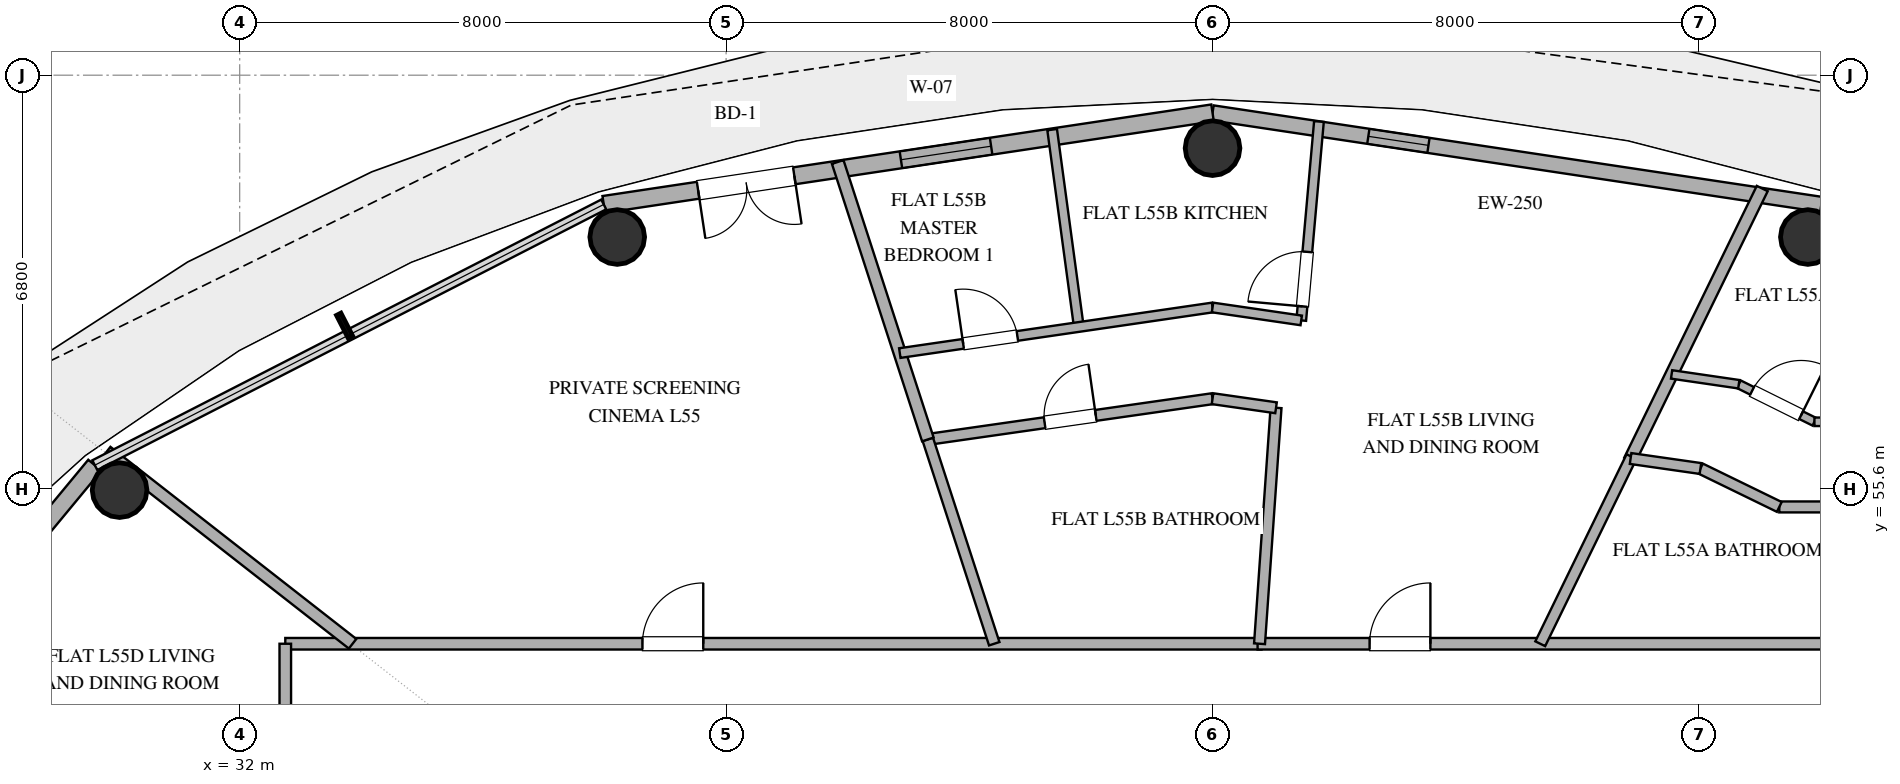
"""IFC4 building model, lengths in metres.
Left out: names, types, materials, properties, quantities, classifications, styles, units other than length and angle.
Written with IfcOpenShell. Run it as: python <this file> out.ifc"""

import sys

from ifc_helpers import new_model, si_unit, direction, frame, frame_2d, origin, origin_2d, place, context, subcontext, project, spatial, rectangle, hollow_circle, extrude, element, fill, save


model = new_model("IFC4")
c1 = context("Model", 3, precision=1e-05, world=origin(), true_north=direction((0.0, 1.0)))
c2 = subcontext(c1, "Body", "Model", "MODEL_VIEW")
j1 = project(units=[si_unit("LENGTHUNIT", "METRE"), si_unit("PLANEANGLEUNIT", "RADIAN")], contexts=[c1])
p1 = place(None, origin())
s1 = spatial("IfcSite", under=j1, at=p1, CompositionType="ELEMENT")
p2 = place(p1, origin())
s2 = spatial("IfcBuilding", under=s1, at=p2, CompositionType="ELEMENT")
p3 = place(p2, frame((0.0, 0.0, 217.2)))
s3 = spatial("IfcBuildingStorey", under=s2, at=p3, CompositionType="ELEMENT", Elevation=217.2)
for number, where, z_axis, x_axis in (
    (1, (57.791, 59.739, 0.0), (0.0, 0.0, 1.0), (1.0, 0.0, 0.0)),
    (2, (48.0, 61.2, 0.0), (0.0, 0.0, 1.0), (1.0, 0.0, 0.0)),
    (3, (38.209, 59.739, 0.0), (0.0, 0.0, 1.0), (1.0, 0.0, 0.0)),
    (4, (30.025, 55.576, 0.0), (0.0, 0.0, 1.0), (1.0, 0.0, 0.0)),
):
    element("IfcColumn", number, at=place(p3, frame(where, z_axis=z_axis, x_axis=x_axis)), inside=s3, PredefinedType="COLUMN", context=c2, shape_type="SweptSolid", body=[
        extrude(hollow_circle(Radius=0.45, WallThickness=0.025, at=origin_2d()), origin(), (0.0, 0.0, 1.0), 3.36),
    ])
p4 = place(p3, frame((66.383, 55.987, 0.0), z_axis=(0.0, 0.0, 1.0), x_axis=(-0.890007394051, 0.455946091699, 0.0)))
e5 = element("IfcWall", 5, at=p4, inside=s3, PredefinedType="SOLIDWALL", context=c2, shape_type="SweptSolid", body=[
    extrude(rectangle(XDim=9.404, YDim=0.28, at=frame_2d((4.702, 0.0))), origin(), (0.0, 0.0, 1.0), 3.36),
])
p5 = place(p4, frame((1.661, 0.0, 0.85)))
e6 = element("IfcOpeningElement", 6, at=p5, cuts=e5, PredefinedType="OPENING", context=c2, shape_type="SweptSolid", body=[
    extrude(rectangle(XDim=1.0, YDim=1.8, at=frame_2d((0.5, 0.9))), frame((0.0, 0.15, 0.0), z_axis=(0.0, -1.0, 0.0), x_axis=(1.0, 0.0, 0.0)), (0.0, 0.0, 1.0), 0.3),
])
p6 = place(p4, frame((3.823, 0.0, 0.85)))
e7 = element("IfcOpeningElement", 7, at=p6, cuts=e5, PredefinedType="OPENING", context=c2, shape_type="SweptSolid", body=[
    extrude(rectangle(XDim=1.5, YDim=2.0, at=frame_2d((0.75, 1.0))), frame((0.0, 0.15, 0.0), z_axis=(0.0, -1.0, 0.0), x_axis=(1.0, 0.0, 0.0)), (0.0, 0.0, 1.0), 0.3),
])
p7 = place(p4, frame((6.503, 0.0, 0.85)))
e8 = element("IfcOpeningElement", 8, at=p7, cuts=e5, PredefinedType="OPENING", context=c2, shape_type="SweptSolid", body=[
    extrude(rectangle(XDim=1.35, YDim=1.8, at=frame_2d((0.675, 0.9))), frame((0.0, 0.15, 0.0), z_axis=(0.0, -1.0, 0.0), x_axis=(1.0, 0.0, 0.0)), (0.0, 0.0, 1.0), 0.3),
])
p8 = place(p3, frame((58.013, 60.274, 0.0), z_axis=(0.0, 0.0, 1.0), x_axis=(-0.988882522213, 0.148698881169, 0.0)))
e9 = element("IfcWall", 9, at=p8, inside=s3, PredefinedType="SOLIDWALL", context=c2, shape_type="SweptSolid", body=[
    extrude(rectangle(XDim=10.125, YDim=0.25, at=frame_2d((5.062, 0.0))), origin(), (0.0, 0.0, 1.0), 3.36),
])
p9 = place(p8, frame((6.534, 0.0, 1.42)))
e10 = element("IfcOpeningElement", 10, at=p9, cuts=e9, PredefinedType="OPENING", context=c2, shape_type="SweptSolid", body=[
    extrude(rectangle(XDim=1.0, YDim=1.05, at=frame_2d((0.5, 0.525))), frame((0.0, 0.135, 0.0), z_axis=(0.0, -1.0, 0.0), x_axis=(1.0, 0.0, 0.0)), (0.0, 0.0, 1.0), 0.27),
])
p10 = place(p3, frame((48.0, 61.78, 0.0), z_axis=(0.0, 0.0, 1.0), x_axis=(-0.988882522213, -0.148698881169, 0.0)))
e11 = element("IfcWall", 11, at=p10, inside=s3, PredefinedType="SOLIDWALL", context=c2, shape_type="SweptSolid", body=[
    extrude(rectangle(XDim=10.125, YDim=0.28, at=frame_2d((5.062, 0.0))), origin(), (0.0, 0.0, 1.0), 3.36),
])
p11 = place(p10, frame((3.683, 0.0, 0.85)))
e12 = element("IfcOpeningElement", 12, at=p11, cuts=e11, PredefinedType="OPENING", context=c2, shape_type="SweptSolid", body=[
    extrude(rectangle(XDim=1.5, YDim=1.8, at=frame_2d((0.75, 0.9))), frame((0.0, 0.15, 0.0), z_axis=(0.0, -1.0, 0.0), x_axis=(1.0, 0.0, 0.0)), (0.0, 0.0, 1.0), 0.3),
])
p12 = place(p10, frame((6.956, 0.0, 0.0)))
e13 = element("IfcOpeningElement", 13, at=p12, cuts=e11, PredefinedType="OPENING", context=c2, shape_type="SweptSolid", body=[
    extrude(rectangle(XDim=1.6, YDim=2.25, at=frame_2d((0.8, 1.125))), frame((0.0, 0.15, 0.0), z_axis=(0.0, -1.0, 0.0), x_axis=(1.0, 0.0, 0.0)), (0.0, 0.0, 1.0), 0.3),
])
p13 = place(p3, frame((29.617, 55.987, 0.0), z_axis=(0.0, 0.0, 1.0), x_axis=(-0.63761509934, -0.770355103243, 0.0)))
e14 = element("IfcWall", 14, at=p13, inside=s3, PredefinedType="SOLIDWALL", context=c2, shape_type="SweptSolid", body=[
    extrude(rectangle(XDim=8.33, YDim=0.28, at=frame_2d((4.165, 0.0))), origin(), (0.0, 0.0, 1.0), 3.36),
])
p14 = place(p13, frame((2.074, 0.0, 0.85)))
e15 = element("IfcOpeningElement", 15, at=p14, cuts=e14, PredefinedType="OPENING", context=c2, shape_type="SweptSolid", body=[
    extrude(rectangle(XDim=1.2, YDim=1.8, at=frame_2d((0.6, 0.9))), frame((0.0, 0.15, 0.0), z_axis=(0.0, -1.0, 0.0), x_axis=(1.0, 0.0, 0.0)), (0.0, 0.0, 1.0), 0.3),
])
p15 = place(p13, frame((3.892, 0.0, 0.85)))
e16 = element("IfcOpeningElement", 16, at=p15, cuts=e14, PredefinedType="OPENING", context=c2, shape_type="SweptSolid", body=[
    extrude(rectangle(XDim=1.2, YDim=1.8, at=frame_2d((0.6, 0.9))), frame((0.0, 0.15, 0.0), z_axis=(0.0, -1.0, 0.0), x_axis=(1.0, 0.0, 0.0)), (0.0, 0.0, 1.0), 0.3),
])
p16 = place(p3, frame((32.75, 53.05, 0.0), z_axis=(0.0, 0.0, 1.0), x_axis=(1.0, 0.0, 0.0)))
e17 = element("IfcWall", 17, at=p16, inside=s3, PredefinedType="PARTITIONING", context=c2, shape_type="SweptSolid", body=[
    extrude(rectangle(XDim=16.055, YDim=0.19, at=frame_2d((8.027, 0.0))), origin(), (0.0, 0.0, 1.0), 2.72),
])
p17 = place(p16, frame((5.874, 0.0, 0.0)))
e18 = element("IfcOpeningElement", 18, at=p17, cuts=e17, PredefinedType="OPENING", context=c2, shape_type="SweptSolid", body=[
    extrude(rectangle(XDim=1.0, YDim=2.2, at=frame_2d((0.5, 1.1))), frame((0.0, 0.105, 0.0), z_axis=(0.0, -1.0, 0.0), x_axis=(1.0, 0.0, 0.0)), (0.0, 0.0, 1.0), 0.21),
])
p18 = place(p3, frame((48.74, 53.05, 0.0), z_axis=(0.0, 0.0, 1.0), x_axis=(1.0, 0.0, 0.0)))
e19 = element("IfcWall", 19, at=p18, inside=s3, PredefinedType="PARTITIONING", context=c2, shape_type="SweptSolid", body=[
    extrude(rectangle(XDim=14.51, YDim=0.19, at=frame_2d((7.255, 0.0))), origin(), (0.0, 0.0, 1.0), 2.72),
])
p19 = place(p18, frame((1.842, 0.0, 0.0)))
e20 = element("IfcOpeningElement", 20, at=p19, cuts=e19, PredefinedType="OPENING", context=c2, shape_type="SweptSolid", body=[
    extrude(rectangle(XDim=1.0, YDim=2.2, at=frame_2d((0.5, 1.1))), frame((0.0, 0.105, 0.0), z_axis=(0.0, -1.0, 0.0), x_axis=(1.0, 0.0, 0.0)), (0.0, 0.0, 1.0), 0.21),
])
p20 = place(p3, frame((32.75, 43.356, 0.0), z_axis=(0.0, 0.0, 1.0), x_axis=(0.0, 1.0, 0.0)))
e21 = element("IfcWall", 21, at=p20, inside=s3, PredefinedType="PARTITIONING", context=c2, shape_type="SweptSolid", body=[
    extrude(rectangle(XDim=9.694, YDim=0.19, at=frame_2d((4.847, 0.0))), origin(), (0.0, 0.0, 1.0), 2.72),
])
p21 = place(p20, frame((5.983, 0.0, 0.0)))
e22 = element("IfcOpeningElement", 22, at=p21, cuts=e21, PredefinedType="OPENING", context=c2, shape_type="SweptSolid", body=[
    extrude(rectangle(XDim=1.0, YDim=2.2, at=frame_2d((0.5, 1.1))), frame((0.0, 0.105, 0.0), z_axis=(0.0, -1.0, 0.0), x_axis=(1.0, 0.0, 0.0)), (0.0, 0.0, 1.0), 0.21),
])
p22 = place(p3, frame((29.813, 56.209, 0.0), z_axis=(0.0, 0.0, 1.0), x_axis=(0.788043849094, -0.615619112687, 0.0)))
e23 = element("IfcWall", 23, at=p22, inside=s3, PredefinedType="PARTITIONING", context=c2, shape_type="SweptSolid", body=[
    extrude(rectangle(XDim=5.131, YDim=0.2, at=frame_2d((2.566, 0.0))), origin(), (0.0, 0.0, 1.0), 2.72),
])
p23 = place(p3, frame((43.318, 56.41, 0.0), z_axis=(0.0, 0.0, 1.0), x_axis=(0.989918499483, 0.141638145927, 0.0)))
e24 = element("IfcWall", 24, at=p23, inside=s3, PredefinedType="PLUMBINGWALL", context=c2, shape_type="SweptSolid", body=[
    extrude(rectangle(XDim=4.73, YDim=0.18, at=frame_2d((2.365, 0.0))), origin(), (0.0, 0.0, 1.0), 2.72),
])
p24 = place(p23, frame((1.94, 0.0, 0.0)))
e25 = element("IfcOpeningElement", 25, at=p24, cuts=e24, PredefinedType="OPENING", context=c2, shape_type="SweptSolid", body=[
    extrude(rectangle(XDim=0.85, YDim=2.1, at=frame_2d((0.425, 1.05))), frame((0.0, 0.1, 0.0), z_axis=(0.0, -1.0, 0.0), x_axis=(1.0, 0.0, 0.0)), (0.0, 0.0, 1.0), 0.2),
])
p25 = place(p3, frame((49.044, 56.931, 0.0), z_axis=(0.0, 0.0, 1.0), x_axis=(-0.0697885329, -0.997561807948, 0.0)))
e26 = element("IfcWall", 26, at=p25, inside=s3, PredefinedType="PLUMBINGWALL", context=c2, shape_type="SweptSolid", body=[
    extrude(rectangle(XDim=3.89, YDim=0.18, at=frame_2d((1.945, 0.0))), origin(), (0.0, 0.0, 1.0), 2.72),
])
p26 = place(p3, frame((44.41, 53.05, 0.0), z_axis=(0.0, 0.0, 1.0), x_axis=(-0.309025133622, 0.951053871655, 0.0)))
e27 = element("IfcWall", 27, at=p26, inside=s3, PredefinedType="PLUMBINGWALL", context=c2, shape_type="SweptSolid", body=[
    extrude(rectangle(XDim=3.533, YDim=0.18, at=frame_2d((1.767, 0.0))), origin(), (0.0, 0.0, 1.0), 2.72),
])
p27 = place(p3, frame((57.041, 60.536, 0.0), z_axis=(0.0, 0.0, 1.0), x_axis=(-0.438355931311, -0.898801467224, 0.0)))
e28 = element("IfcWall", 28, at=p27, inside=s3, PredefinedType="PARTITIONING", context=c2, shape_type="SweptSolid", body=[
    extrude(rectangle(XDim=4.974, YDim=0.2, at=frame_2d((2.487, 0.0))), origin(), (0.0, 0.0, 1.0), 2.72),
])
p28 = place(p3, frame((54.89, 56.127, 0.0), z_axis=(0.0, 0.0, 1.0), x_axis=(-0.438347749683, -0.898805457453, 0.0)))
e29 = element("IfcWall", 29, at=p28, inside=s3, PredefinedType="PLUMBINGWALL", context=c2, shape_type="SweptSolid", body=[
    extrude(rectangle(XDim=3.423, YDim=0.18, at=frame_2d((1.711, 0.0))), origin(), (0.0, 0.0, 1.0), 2.72),
])
p29 = place(p3, frame((43.318, 56.41, 0.0), z_axis=(0.0, 0.0, 1.0), x_axis=(-0.309012424199, 0.951058001223, 0.0)))
e30 = element("IfcWall", 30, at=p29, inside=s3, PredefinedType="PARTITIONING", context=c2, shape_type="SweptSolid", body=[
    extrude(rectangle(XDim=4.797, YDim=0.2, at=frame_2d((2.399, 0.0))), origin(), (0.0, 0.0, 1.0), 2.72),
])
p30 = place(p3, frame((49.458, 58.367, 0.0), z_axis=(0.0, 0.0, 1.0), x_axis=(0.088772560689, 0.996051922577, 0.0)))
e31 = element("IfcWall", 31, at=p30, inside=s3, PredefinedType="PLUMBINGWALL", context=c2, shape_type="SweptSolid", body=[
    extrude(rectangle(XDim=3.284, YDim=0.16, at=frame_2d((1.642, 0.0))), origin(), (0.0, 0.0, 1.0), 2.72),
])
p31 = place(p30, frame((0.232, 0.0, 0.0)))
e32 = element("IfcOpeningElement", 32, at=p31, cuts=e31, PredefinedType="OPENING", context=c2, shape_type="SweptSolid", body=[
    extrude(rectangle(XDim=0.9, YDim=2.1, at=frame_2d((0.45, 1.05))), frame((0.0, 0.09, 0.0), z_axis=(0.0, -1.0, 0.0), x_axis=(1.0, 0.0, 0.0)), (0.0, 0.0, 1.0), 0.18),
])
p32 = place(p3, frame((45.801, 58.259, 0.0), z_axis=(0.0, 0.0, 1.0), x_axis=(-0.13403859548, 0.990976112185, 0.0)))
e33 = element("IfcWall", 33, at=p32, inside=s3, PredefinedType="PLUMBINGWALL", context=c2, shape_type="SweptSolid", body=[
    extrude(rectangle(XDim=3.275, YDim=0.16, at=frame_2d((1.637, 0.0))), origin(), (0.0, 0.0, 1.0), 2.72),
])
p33 = place(p3, frame((42.856, 57.83, 0.0), z_axis=(0.0, 0.0, 1.0), x_axis=(0.989542480506, 0.144241739018, 0.0)))
e34 = element("IfcWall", 34, at=p33, inside=s3, PredefinedType="PLUMBINGWALL", context=c2, shape_type="SweptSolid", body=[
    extrude(rectangle(XDim=5.198, YDim=0.16, at=frame_2d((2.599, 0.0))), origin(), (0.0, 0.0, 1.0), 2.72),
])
p34 = place(p33, frame((1.054, 0.0, 0.0)))
e35 = element("IfcOpeningElement", 35, at=p34, cuts=e34, PredefinedType="OPENING", context=c2, shape_type="SweptSolid", body=[
    extrude(rectangle(XDim=0.9, YDim=2.1, at=frame_2d((0.45, 1.05))), frame((0.0, 0.09, 0.0), z_axis=(0.0, -1.0, 0.0), x_axis=(1.0, 0.0, 0.0)), (0.0, 0.0, 1.0), 0.18),
])
p35 = place(p3, frame((57.321, 55.3, 0.0), z_axis=(0.0, 0.0, 1.0), x_axis=(1.0, 0.0, 0.0)))
e36 = element("IfcWall", 36, at=p35, inside=s3, PredefinedType="PLUMBINGWALL", context=c2, shape_type="SweptSolid", body=[
    extrude(rectangle(XDim=1.748, YDim=0.18, at=frame_2d((0.874, 0.0))), origin(), (0.0, 0.0, 1.0), 2.72),
])
p36 = place(p3, frame((48.0, 58.58, 0.0), z_axis=(0.0, 0.0, 1.0), x_axis=(0.989514247961, -0.144435290295, 0.0)))
e37 = element("IfcWall", 37, at=p36, inside=s3, PredefinedType="PLUMBINGWALL", context=c2, shape_type="SweptSolid", body=[
    extrude(rectangle(XDim=1.474, YDim=0.16, at=frame_2d((0.737, 0.0))), origin(), (0.0, 0.0, 1.0), 2.72),
])
p37 = place(p3, frame((56.024, 55.932, 0.0), z_axis=(0.0, 0.0, 1.0), x_axis=(0.898916394035, -0.438120207861, 0.0)))
e38 = element("IfcWall", 38, at=p37, inside=s3, PredefinedType="PLUMBINGWALL", context=c2, shape_type="SweptSolid", body=[
    extrude(rectangle(XDim=1.443, YDim=0.18, at=frame_2d((0.721, 0.0))), origin(), (0.0, 0.0, 1.0), 2.72),
])
p38 = place(p3, frame((56.655, 57.318, 0.0), z_axis=(0.0, 0.0, 1.0), x_axis=(0.895584310315, -0.444891833053, 0.0)))
e39 = element("IfcWall", 39, at=p38, inside=s3, PredefinedType="PARTITIONING", context=c2, shape_type="SweptSolid", body=[
    extrude(rectangle(XDim=1.389, YDim=0.14, at=frame_2d((0.694, 0.0))), origin(), (0.0, 0.0, 1.0), 2.72),
])
p39 = place(p38, frame((0.244, 0.0, 0.0)))
e40 = element("IfcOpeningElement", 40, at=p39, cuts=e39, PredefinedType="OPENING", context=c2, shape_type="SweptSolid", body=[
    extrude(rectangle(XDim=0.9, YDim=2.1, at=frame_2d((0.45, 1.05))), frame((0.0, 0.08, 0.0), z_axis=(0.0, -1.0, 0.0), x_axis=(1.0, 0.0, 0.0)), (0.0, 0.0, 1.0), 0.16),
])
p40 = place(p3, frame((54.875, 56.096, 0.0), z_axis=(0.0, 0.0, 1.0), x_axis=(0.989924230083, -0.141598088596, 0.0)))
e41 = element("IfcWall", 41, at=p40, inside=s3, PredefinedType="PLUMBINGWALL", context=c2, shape_type="SweptSolid", body=[
    extrude(rectangle(XDim=1.16, YDim=0.18, at=frame_2d((0.58, 0.0))), origin(), (0.0, 0.0, 1.0), 2.72),
])
p41 = place(p3, frame((55.55, 57.479, 0.0), z_axis=(0.0, 0.0, 1.0), x_axis=(0.989534281859, -0.144297973051, 0.0)))
e42 = element("IfcWall", 42, at=p41, inside=s3, PredefinedType="PARTITIONING", context=c2, shape_type="SweptSolid", body=[
    extrude(rectangle(XDim=1.117, YDim=0.14, at=frame_2d((0.558, 0.0))), origin(), (0.0, 0.0, 1.0), 2.72),
])
p42 = place(p3, frame((57.899, 56.7, 0.0), z_axis=(0.0, 0.0, 1.0), x_axis=(1.0, 0.0, 0.0)))
e43 = element("IfcWall", 43, at=p42, inside=s3, PredefinedType="PARTITIONING", context=c2, shape_type="SweptSolid", body=[
    extrude(rectangle(XDim=1.065, YDim=0.14, at=frame_2d((0.533, 0.0))), origin(), (0.0, 0.0, 1.0), 2.72),
])
p43 = place(p3, frame((48.0, 57.08, 0.0), z_axis=(0.0, 0.0, 1.0), x_axis=(0.989917064499, -0.141648174766, 0.0)))
e44 = element("IfcWall", 44, at=p43, inside=s3, PredefinedType="PLUMBINGWALL", context=c2, shape_type="SweptSolid", body=[
    extrude(rectangle(XDim=1.055, YDim=0.18, at=frame_2d((0.527, 0.0))), origin(), (0.0, 0.0, 1.0), 2.72),
])
p44 = place(p11, origin())
e45 = element("IfcWindow", 45, at=p44, inside=s3, PartitioningType="SINGLE_PANEL", PredefinedType="WINDOW", context=c2, shape_type="SweptSolid", body=[
    extrude(rectangle(XDim=1.5, YDim=1.8, at=frame_2d((0.75, 0.9))), frame((0.0, 0.03, 0.0), z_axis=(0.0, -1.0, 0.0), x_axis=(1.0, 0.0, 0.0)), (0.0, 0.0, 1.0), 0.06),
])
fill(e12, e45)
p45 = place(p12, origin())
e46 = element("IfcDoor", 46, at=p45, inside=s3, OperationType="DOUBLE_DOOR_SINGLE_SWING", PredefinedType="DOOR", context=c2, shape_type="SweptSolid", body=[
    extrude(rectangle(XDim=1.6, YDim=2.25, at=frame_2d((0.8, 1.125))), frame((0.0, 0.025, 0.0), z_axis=(0.0, -1.0, 0.0), x_axis=(1.0, 0.0, 0.0)), (0.0, 0.0, 1.0), 0.05),
])
fill(e13, e46)
p46 = place(p9, origin())
e47 = element("IfcWindow", 47, at=p46, inside=s3, PartitioningType="SINGLE_PANEL", PredefinedType="WINDOW", context=c2, shape_type="SweptSolid", body=[
    extrude(rectangle(XDim=1.0, YDim=1.05, at=frame_2d((0.5, 0.525))), frame((0.0, 0.03, 0.0), z_axis=(0.0, -1.0, 0.0), x_axis=(1.0, 0.0, 0.0)), (0.0, 0.0, 1.0), 0.06),
])
fill(e10, e47)
p47 = place(p17, origin())
e48 = element("IfcDoor", 48, at=p47, inside=s3, OperationType="SINGLE_SWING_RIGHT", PredefinedType="DOOR", context=c2, shape_type="SweptSolid", body=[
    extrude(rectangle(XDim=1.0, YDim=2.2, at=frame_2d((0.5, 1.1))), frame((0.0, 0.025, 0.0), z_axis=(0.0, -1.0, 0.0), x_axis=(1.0, 0.0, 0.0)), (0.0, 0.0, 1.0), 0.05),
])
fill(e18, e48)
p48 = place(p19, origin())
e49 = element("IfcDoor", 49, at=p48, inside=s3, OperationType="SINGLE_SWING_RIGHT", PredefinedType="DOOR", context=c2, shape_type="SweptSolid", body=[
    extrude(rectangle(XDim=1.0, YDim=2.2, at=frame_2d((0.5, 1.1))), frame((0.0, 0.025, 0.0), z_axis=(0.0, -1.0, 0.0), x_axis=(1.0, 0.0, 0.0)), (0.0, 0.0, 1.0), 0.05),
])
fill(e20, e49)
p49 = place(p24, origin())
e50 = element("IfcDoor", 50, at=p49, inside=s3, OperationType="SINGLE_SWING_RIGHT", PredefinedType="DOOR", context=c2, shape_type="SweptSolid", body=[
    extrude(rectangle(XDim=0.85, YDim=2.1, at=frame_2d((0.425, 1.05))), frame((0.0, 0.025, 0.0), z_axis=(0.0, -1.0, 0.0), x_axis=(1.0, 0.0, 0.0)), (0.0, 0.0, 1.0), 0.05),
])
fill(e25, e50)
p50 = place(p31, origin())
e51 = element("IfcDoor", 51, at=p50, inside=s3, OperationType="SINGLE_SWING_LEFT", PredefinedType="DOOR", context=c2, shape_type="SweptSolid", body=[
    extrude(rectangle(XDim=0.9, YDim=2.1, at=frame_2d((0.45, 1.05))), frame((0.0, 0.025, 0.0), z_axis=(0.0, -1.0, 0.0), x_axis=(1.0, 0.0, 0.0)), (0.0, 0.0, 1.0), 0.05),
])
fill(e32, e51)
p51 = place(p34, origin())
e52 = element("IfcDoor", 52, at=p51, inside=s3, OperationType="SINGLE_SWING_LEFT", PredefinedType="DOOR", context=c2, shape_type="SweptSolid", body=[
    extrude(rectangle(XDim=0.9, YDim=2.1, at=frame_2d((0.45, 1.05))), frame((0.0, 0.025, 0.0), z_axis=(0.0, -1.0, 0.0), x_axis=(1.0, 0.0, 0.0)), (0.0, 0.0, 1.0), 0.05),
])
fill(e35, e52)
p52 = place(p39, origin())
e53 = element("IfcDoor", 53, at=p52, inside=s3, OperationType="SINGLE_SWING_RIGHT", PredefinedType="DOOR", context=c2, shape_type="SweptSolid", body=[
    extrude(rectangle(XDim=0.9, YDim=2.1, at=frame_2d((0.45, 1.05))), frame((0.0, 0.025, 0.0), z_axis=(0.0, -1.0, 0.0), x_axis=(1.0, 0.0, 0.0)), (0.0, 0.0, 1.0), 0.05),
])
fill(e40, e53)
save(model, sys.argv[1])
